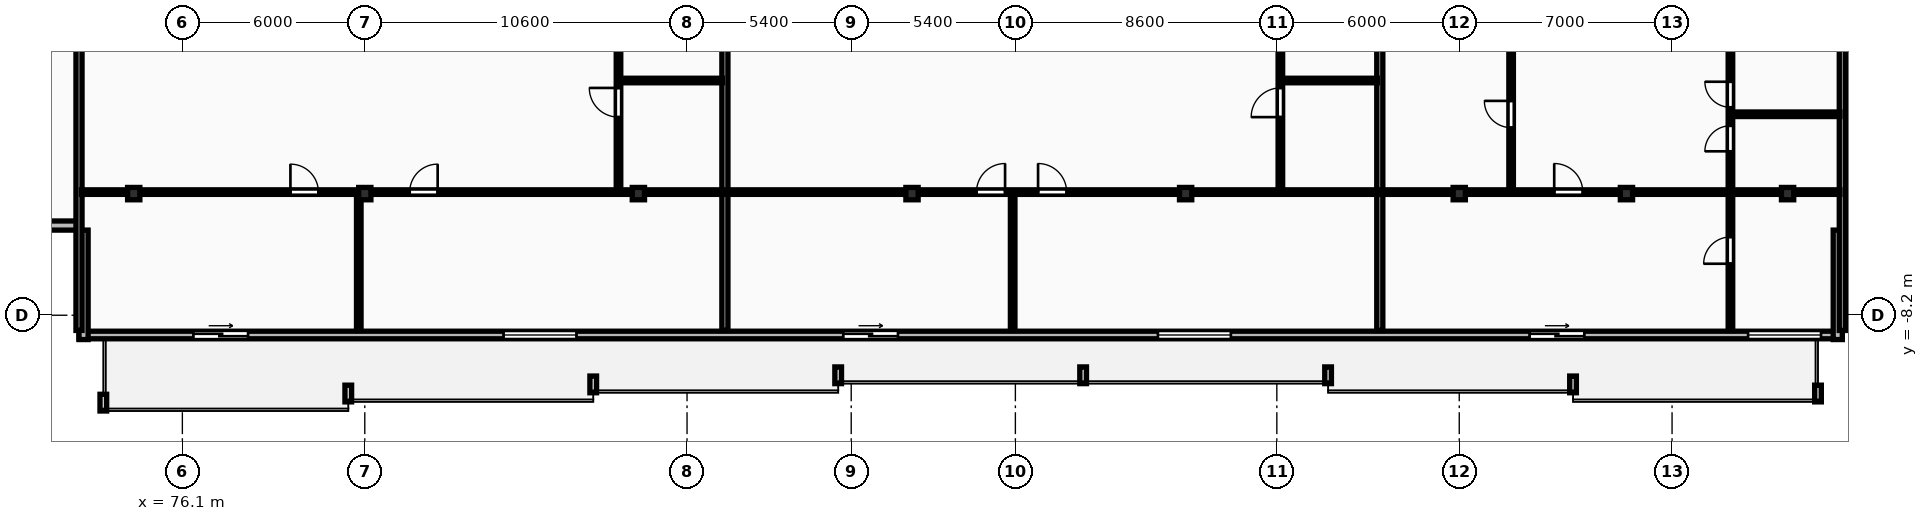
"""IFC4 building model, lengths in metres.
Left out: names, types, materials, properties, quantities, classifications, styles, units other than length and angle.
Written with IfcOpenShell. Run it as: python <this file> out.ifc"""

import sys

from ifc_helpers import new_model, si_unit, direction, frame, frame_2d, origin, origin_2d, place, context, subcontext, project, spatial, rectangle, i_section, extrude, element, fill, save


model = new_model("IFC4")
c1 = context("Model", 3, precision=1e-05, world=origin(), true_north=direction((0.0, 1.0)))
c2 = subcontext(c1, "Body", "Model", "MODEL_VIEW")
j1 = project(units=[si_unit("LENGTHUNIT", "METRE"), si_unit("PLANEANGLEUNIT", "RADIAN")], contexts=[c1])
p1 = place(None, origin())
s1 = spatial("IfcSite", under=j1, at=p1, CompositionType="ELEMENT")
p2 = place(p1, origin())
s2 = spatial("IfcBuilding", under=s1, at=p2, CompositionType="ELEMENT")
p3 = place(p2, frame((0.0, 0.0, 150.1)))
s3 = spatial("IfcBuildingStorey", under=s2, at=p3, CompositionType="ELEMENT", Elevation=150.1)
for number, where, z_axis, x_axis in (
    (1, (74.5, -4.2, 0.0), (0.0, 0.0, 1.0), (1.0, 0.0, 0.0)),
    (2, (82.1, -4.2, 0.0), (0.0, 0.0, 1.0), (1.0, 0.0, 0.0)),
    (3, (91.1, -4.2, 0.0), (0.0, 0.0, 1.0), (1.0, 0.0, 0.0)),
    (4, (100.1, -4.2, 0.0), (0.0, 0.0, 1.0), (1.0, 0.0, 0.0)),
    (5, (109.1, -4.2, 0.0), (0.0, 0.0, 1.0), (1.0, 0.0, 0.0)),
    (6, (118.1, -4.2, 0.0), (0.0, 0.0, 1.0), (1.0, 0.0, 0.0)),
    (7, (123.6, -4.2, 0.0), (0.0, 0.0, 1.0), (1.0, 0.0, 0.0)),
    (8, (128.9, -4.2, 0.0), (0.0, 0.0, 1.0), (1.0, 0.0, 0.0)),
):
    element("IfcColumn", number, at=place(p3, frame(where, z_axis=z_axis, x_axis=x_axis)), inside=s3, PredefinedType="COLUMN", context=c2, shape_type="SweptSolid", body=[
        extrude(i_section(OverallWidth=0.403, OverallDepth=0.406, WebThickness=0.027, FlangeThickness=0.043, FilletRadius=0.015, at=origin_2d()), origin(), (0.0, 0.0, 1.0), 3.6),
    ])
p4 = place(p3, frame((72.7, -8.85, 0.0), z_axis=(0.0, 0.0, 1.0), x_axis=(1.0, 0.0, 0.0)))
e9 = element("IfcWall", 9, at=p4, inside=s3, PredefinedType="STANDARD", context=c2, shape_type="SweptSolid", body=[
    extrude(rectangle(XDim=58.0, YDim=0.25, at=frame_2d((29.0, 0.0))), origin(), (0.0, 0.0, 1.0), 3.31),
])
p5 = place(p4, frame((3.761, 0.0, 0.0)))
e10 = element("IfcOpeningElement", 10, at=p5, cuts=e9, PredefinedType="OPENING", context=c2, shape_type="SweptSolid", body=[
    extrude(rectangle(XDim=1.8, YDim=2.2, at=frame_2d((0.9, 1.1))), frame((0.0, 0.135, 0.0), z_axis=(0.0, -1.0, 0.0), x_axis=(1.0, 0.0, 0.0)), (0.0, 0.0, 1.0), 0.27),
])
p6 = place(p4, frame((13.964, 0.0, 0.85)))
e11 = element("IfcOpeningElement", 11, at=p6, cuts=e9, PredefinedType="OPENING", context=c2, shape_type="SweptSolid", body=[
    extrude(rectangle(XDim=2.4, YDim=1.9, at=frame_2d((1.2, 0.95))), frame((0.0, 0.135, 0.0), z_axis=(0.0, -1.0, 0.0), x_axis=(1.0, 0.0, 0.0)), (0.0, 0.0, 1.0), 0.27),
])
p7 = place(p4, frame((25.138, 0.0, 0.0)))
e12 = element("IfcOpeningElement", 12, at=p7, cuts=e9, PredefinedType="OPENING", context=c2, shape_type="SweptSolid", body=[
    extrude(rectangle(XDim=1.8, YDim=2.2, at=frame_2d((0.9, 1.1))), frame((0.0, 0.135, 0.0), z_axis=(0.0, -1.0, 0.0), x_axis=(1.0, 0.0, 0.0)), (0.0, 0.0, 1.0), 0.27),
])
p8 = place(p4, frame((35.489, 0.0, 0.85)))
e13 = element("IfcOpeningElement", 13, at=p8, cuts=e9, PredefinedType="OPENING", context=c2, shape_type="SweptSolid", body=[
    extrude(rectangle(XDim=2.4, YDim=1.9, at=frame_2d((1.2, 0.95))), frame((0.0, 0.135, 0.0), z_axis=(0.0, -1.0, 0.0), x_axis=(1.0, 0.0, 0.0)), (0.0, 0.0, 1.0), 0.27),
])
p9 = place(p4, frame((47.713, 0.0, 0.0)))
e14 = element("IfcOpeningElement", 14, at=p9, cuts=e9, PredefinedType="OPENING", context=c2, shape_type="SweptSolid", body=[
    extrude(rectangle(XDim=1.8, YDim=2.2, at=frame_2d((0.9, 1.1))), frame((0.0, 0.135, 0.0), z_axis=(0.0, -1.0, 0.0), x_axis=(1.0, 0.0, 0.0)), (0.0, 0.0, 1.0), 0.27),
])
p10 = place(p4, frame((54.9, 0.0, 0.85)))
e15 = element("IfcOpeningElement", 15, at=p10, cuts=e9, PredefinedType="OPENING", context=c2, shape_type="SweptSolid", body=[
    extrude(rectangle(XDim=2.4, YDim=1.9, at=frame_2d((1.2, 0.95))), frame((0.0, 0.135, 0.0), z_axis=(0.0, -1.0, 0.0), x_axis=(1.0, 0.0, 0.0)), (0.0, 0.0, 1.0), 0.27),
])
for number, where, z_axis, x_axis in (
    (16, (130.55, -9.0, 0.0), (0.0, 0.0, 1.0), (0.0, 1.0, 0.0)),
    (17, (130.7, -5.25, 0.0), (0.0, 0.0, 1.0), (1.0, 0.0, 0.0)),
):
    element("IfcWall", number, at=place(p3, frame(where, z_axis=z_axis, x_axis=x_axis)), inside=s3, PredefinedType="STANDARD", context=c2, shape_type="SweptSolid", body=[
        extrude(rectangle(XDim=3.6, YDim=0.3, at=frame_2d((1.8, 0.0))), origin(), (0.0, 0.0, 1.0), 3.31),
    ])
p11 = place(p3, frame((69.1, -5.25, 0.0), z_axis=(0.0, 0.0, 1.0), x_axis=(1.0, 0.0, 0.0)))
e18 = element("IfcWall", 18, at=p11, inside=s3, PredefinedType="STANDARD", context=c2, shape_type="SweptSolid", body=[
    extrude(rectangle(XDim=3.6, YDim=0.3, at=frame_2d((1.8, 0.0))), origin(), (0.0, 0.0, 1.0), 3.31),
])
p12 = place(p3, frame((72.85, -5.4, 0.0), z_axis=(0.0, 0.0, 1.0), x_axis=(0.0, -1.0, 0.0)))
e19 = element("IfcWall", 19, at=p12, inside=s3, PredefinedType="STANDARD", context=c2, shape_type="SweptSolid", body=[
    extrude(rectangle(XDim=3.6, YDim=0.3, at=frame_2d((1.8, 0.0))), origin(), (0.0, 0.0, 1.0), 3.31),
])
for number, where, z_axis, x_axis in (
    (20, (72.7, -8.7, 0.0), (0.0, 0.0, 1.0), (0.0, 1.0, 0.0)),
    (21, (130.7, -8.7, 0.0), (0.0, 0.0, 1.0), (0.0, 1.0, 0.0)),
    (22, (93.946, -8.7, 0.0), (0.0, 0.0, 1.0), (0.0, 1.0, 0.0)),
):
    element("IfcWall", number, at=place(p3, frame(where, z_axis=z_axis, x_axis=x_axis)), inside=s3, PredefinedType="PARTITIONING", context=c2, shape_type="SweptSolid", body=[
        extrude(rectangle(XDim=24.57, YDim=0.2, at=frame_2d((12.285, 0.0))), origin(), (0.0, 0.0, 1.0), 3.31),
    ])
p13 = place(p3, frame((90.506, -0.48, 0.0), z_axis=(0.0, 0.0, 1.0), x_axis=(1.0, 0.0, 0.0)))
e23 = element("IfcWall", 23, at=p13, inside=s3, PredefinedType="PARTITIONING", context=c2, shape_type="SweptSolid", body=[
    extrude(rectangle(XDim=3.36, YDim=0.15, at=frame_2d((1.68, 0.0))), origin(), (0.0, 0.0, 1.0), 3.31),
])
p14 = place(p3, frame((90.446, -4.09, 0.0), z_axis=(0.0, 0.0, 1.0), x_axis=(0.0, 1.0, 0.0)))
e24 = element("IfcWall", 24, at=p14, inside=s3, PredefinedType="PARTITIONING", context=c2, shape_type="SweptSolid", body=[
    extrude(rectangle(XDim=19.98, YDim=0.15, at=frame_2d((9.99, 0.0))), origin(), (0.0, 0.0, 1.0), 3.31),
])
p15 = place(p14, frame((2.406, 0.0, 0.0)))
e25 = element("IfcOpeningElement", 25, at=p15, cuts=e24, PredefinedType="OPENING", context=c2, shape_type="SweptSolid", body=[
    extrude(rectangle(XDim=0.96, YDim=2.1, at=frame_2d((0.48, 1.05))), frame((0.0, 0.085, 0.0), z_axis=(0.0, -1.0, 0.0), x_axis=(1.0, 0.0, 0.0)), (0.0, 0.0, 1.0), 0.17),
])
p16 = place(p14, frame((6.133, 0.0, 0.0)))
e26 = element("IfcOpeningElement", 26, at=p16, cuts=e24, PredefinedType="OPENING", context=c2, shape_type="SweptSolid", body=[
    extrude(rectangle(XDim=0.88, YDim=2.06, at=frame_2d((0.44, 1.03))), frame((0.0, 0.085, 0.0), z_axis=(0.0, -1.0, 0.0), x_axis=(1.0, 0.0, 0.0)), (0.0, 0.0, 1.0), 0.17),
])
p17 = place(p14, frame((8.602, 0.0, 0.0)))
e27 = element("IfcOpeningElement", 27, at=p17, cuts=e24, PredefinedType="OPENING", context=c2, shape_type="SweptSolid", body=[
    extrude(rectangle(XDim=0.84, YDim=2.04, at=frame_2d((0.42, 1.02))), frame((0.0, 0.085, 0.0), z_axis=(0.0, -1.0, 0.0), x_axis=(1.0, 0.0, 0.0)), (0.0, 0.0, 1.0), 0.17),
])
p18 = place(p3, frame((81.903, -8.7, 0.0), z_axis=(0.0, 0.0, 1.0), x_axis=(0.0, 1.0, 0.0)))
e28 = element("IfcWall", 28, at=p18, inside=s3, PredefinedType="PARTITIONING", context=c2, shape_type="SweptSolid", body=[
    extrude(rectangle(XDim=4.47, YDim=0.15, at=frame_2d((2.235, 0.0))), origin(), (0.0, 0.0, 1.0), 3.31),
])
p19 = place(p3, frame((72.78, -4.15, 0.0), z_axis=(0.0, 0.0, 1.0), x_axis=(1.0, 0.0, 0.0)))
e29 = element("IfcWall", 29, at=p19, inside=s3, PredefinedType="PARTITIONING", context=c2, shape_type="SweptSolid", body=[
    extrude(rectangle(XDim=21.085, YDim=0.15, at=frame_2d((10.543, 0.0))), origin(), (0.0, 0.0, 1.0), 3.003),
])
p20 = place(p19, frame((6.874, 0.0, 0.0)))
e30 = element("IfcOpeningElement", 30, at=p20, cuts=e29, PredefinedType="OPENING", context=c2, shape_type="SweptSolid", body=[
    extrude(rectangle(XDim=0.92, YDim=2.08, at=frame_2d((0.46, 1.04))), frame((0.0, 0.085, 0.0), z_axis=(0.0, -1.0, 0.0), x_axis=(1.0, 0.0, 0.0)), (0.0, 0.0, 1.0), 0.17),
])
p21 = place(p19, frame((10.797, 0.0, 0.0)))
e31 = element("IfcOpeningElement", 31, at=p21, cuts=e29, PredefinedType="OPENING", context=c2, shape_type="SweptSolid", body=[
    extrude(rectangle(XDim=0.92, YDim=2.08, at=frame_2d((0.46, 1.04))), frame((0.0, 0.085, 0.0), z_axis=(0.0, -1.0, 0.0), x_axis=(1.0, 0.0, 0.0)), (0.0, 0.0, 1.0), 0.17),
])
p22 = place(p3, frame((115.486, -8.7, 0.0), z_axis=(0.0, 0.0, 1.0), x_axis=(0.0, 1.0, 0.0)))
e32 = element("IfcWall", 32, at=p22, inside=s3, PredefinedType="PARTITIONING", context=c2, shape_type="SweptSolid", body=[
    extrude(rectangle(XDim=24.57, YDim=0.2, at=frame_2d((12.285, 0.0))), origin(), (0.0, 0.0, 1.0), 3.31),
])
p23 = place(p3, frame((112.276, -0.48, 0.0), z_axis=(0.0, 0.0, 1.0), x_axis=(1.0, 0.0, 0.0)))
e33 = element("IfcWall", 33, at=p23, inside=s3, PredefinedType="PARTITIONING", context=c2, shape_type="SweptSolid", body=[
    extrude(rectangle(XDim=3.13, YDim=0.15, at=frame_2d((1.565, 0.0))), origin(), (0.0, 0.0, 1.0), 3.31),
])
p24 = place(p3, frame((112.216, -4.09, 0.0), z_axis=(0.0, 0.0, 1.0), x_axis=(0.0, 1.0, 0.0)))
e34 = element("IfcWall", 34, at=p24, inside=s3, PredefinedType="PARTITIONING", context=c2, shape_type="SweptSolid", body=[
    extrude(rectangle(XDim=19.98, YDim=0.15, at=frame_2d((9.99, 0.0))), origin(), (0.0, 0.0, 1.0), 3.31),
])
p25 = place(p24, frame((2.406, 0.0, 0.0)))
e35 = element("IfcOpeningElement", 35, at=p25, cuts=e34, PredefinedType="OPENING", context=c2, shape_type="SweptSolid", body=[
    extrude(rectangle(XDim=0.96, YDim=2.1, at=frame_2d((0.48, 1.05))), frame((0.0, 0.085, 0.0), z_axis=(0.0, -1.0, 0.0), x_axis=(1.0, 0.0, 0.0)), (0.0, 0.0, 1.0), 0.17),
])
p26 = place(p24, frame((6.133, 0.0, 0.0)))
e36 = element("IfcOpeningElement", 36, at=p26, cuts=e34, PredefinedType="OPENING", context=c2, shape_type="SweptSolid", body=[
    extrude(rectangle(XDim=0.88, YDim=2.06, at=frame_2d((0.44, 1.03))), frame((0.0, 0.085, 0.0), z_axis=(0.0, -1.0, 0.0), x_axis=(1.0, 0.0, 0.0)), (0.0, 0.0, 1.0), 0.17),
])
p27 = place(p24, frame((9.57, 0.0, 0.0)))
e37 = element("IfcOpeningElement", 37, at=p27, cuts=e34, PredefinedType="OPENING", context=c2, shape_type="SweptSolid", body=[
    extrude(rectangle(XDim=0.84, YDim=2.04, at=frame_2d((0.42, 1.02))), frame((0.0, 0.085, 0.0), z_axis=(0.0, -1.0, 0.0), x_axis=(1.0, 0.0, 0.0)), (0.0, 0.0, 1.0), 0.17),
])
p28 = place(p3, frame((103.411, -8.7, 0.0), z_axis=(0.0, 0.0, 1.0), x_axis=(0.0, 1.0, 0.0)))
e38 = element("IfcWall", 38, at=p28, inside=s3, PredefinedType="PARTITIONING", context=c2, shape_type="SweptSolid", body=[
    extrude(rectangle(XDim=4.47, YDim=0.15, at=frame_2d((2.235, 0.0))), origin(), (0.0, 0.0, 1.0), 3.31),
])
p29 = place(p3, frame((94.025, -4.15, 0.0), z_axis=(0.0, 0.0, 1.0), x_axis=(1.0, 0.0, 0.0)))
e39 = element("IfcWall", 39, at=p29, inside=s3, PredefinedType="PARTITIONING", context=c2, shape_type="SweptSolid", body=[
    extrude(rectangle(XDim=21.381, YDim=0.15, at=frame_2d((10.69, 0.0))), origin(), (0.0, 0.0, 1.0), 3.003),
])
p30 = place(p29, frame((8.195, 0.0, 0.0)))
e40 = element("IfcOpeningElement", 40, at=p30, cuts=e39, PredefinedType="OPENING", context=c2, shape_type="SweptSolid", body=[
    extrude(rectangle(XDim=0.94, YDim=2.1, at=frame_2d((0.47, 1.05))), frame((0.0, 0.085, 0.0), z_axis=(0.0, -1.0, 0.0), x_axis=(1.0, 0.0, 0.0)), (0.0, 0.0, 1.0), 0.17),
])
p31 = place(p29, frame((10.22, 0.0, 0.0)))
e41 = element("IfcOpeningElement", 41, at=p31, cuts=e39, PredefinedType="OPENING", context=c2, shape_type="SweptSolid", body=[
    extrude(rectangle(XDim=0.94, YDim=2.1, at=frame_2d((0.47, 1.05))), frame((0.0, 0.085, 0.0), z_axis=(0.0, -1.0, 0.0), x_axis=(1.0, 0.0, 0.0)), (0.0, 0.0, 1.0), 0.17),
])
p32 = place(p3, frame((119.806, -4.09, 0.0), z_axis=(0.0, 0.0, 1.0), x_axis=(0.0, 1.0, 0.0)))
e42 = element("IfcWall", 42, at=p32, inside=s3, PredefinedType="PARTITIONING", context=c2, shape_type="SweptSolid", body=[
    extrude(rectangle(XDim=5.0, YDim=0.15, at=frame_2d((2.5, 0.0))), origin(), (0.0, 0.0, 1.0), 3.31),
])
p33 = place(p32, frame((2.06, 0.0, 0.0)))
e43 = element("IfcOpeningElement", 43, at=p33, cuts=e42, PredefinedType="OPENING", context=c2, shape_type="SweptSolid", body=[
    extrude(rectangle(XDim=0.88, YDim=2.06, at=frame_2d((0.44, 1.03))), frame((0.0, 0.085, 0.0), z_axis=(0.0, -1.0, 0.0), x_axis=(1.0, 0.0, 0.0)), (0.0, 0.0, 1.0), 0.17),
])
p34 = place(p3, frame((127.08, -1.59, 0.0), z_axis=(0.0, 0.0, 1.0), x_axis=(1.0, 0.0, 0.0)))
e44 = element("IfcWall", 44, at=p34, inside=s3, PredefinedType="PARTITIONING", context=c2, shape_type="SweptSolid", body=[
    extrude(rectangle(XDim=3.54, YDim=0.15, at=frame_2d((1.77, 0.0))), origin(), (0.0, 0.0, 1.0), 3.31),
])
p35 = place(p3, frame((127.02, -8.7, 0.0), z_axis=(0.0, 0.0, 1.0), x_axis=(0.0, 1.0, 0.0)))
e45 = element("IfcWall", 45, at=p35, inside=s3, PredefinedType="PARTITIONING", context=c2, shape_type="SweptSolid", body=[
    extrude(rectangle(XDim=9.61, YDim=0.15, at=frame_2d((4.805, 0.0))), origin(), (0.0, 0.0, 1.0), 3.31),
])
p36 = place(p35, frame((5.892, 0.0, 0.0)))
e46 = element("IfcOpeningElement", 46, at=p36, cuts=e45, PredefinedType="OPENING", context=c2, shape_type="SweptSolid", body=[
    extrude(rectangle(XDim=0.84, YDim=2.04, at=frame_2d((0.42, 1.02))), frame((0.0, 0.085, 0.0), z_axis=(0.0, -1.0, 0.0), x_axis=(1.0, 0.0, 0.0)), (0.0, 0.0, 1.0), 0.17),
])
p37 = place(p35, frame((7.34, 0.0, 0.0)))
e47 = element("IfcOpeningElement", 47, at=p37, cuts=e45, PredefinedType="OPENING", context=c2, shape_type="SweptSolid", body=[
    extrude(rectangle(XDim=0.84, YDim=2.04, at=frame_2d((0.42, 1.02))), frame((0.0, 0.085, 0.0), z_axis=(0.0, -1.0, 0.0), x_axis=(1.0, 0.0, 0.0)), (0.0, 0.0, 1.0), 0.17),
])
p38 = place(p35, frame((2.194, 0.0, 0.0)))
e48 = element("IfcOpeningElement", 48, at=p38, cuts=e45, PredefinedType="OPENING", context=c2, shape_type="SweptSolid", body=[
    extrude(rectangle(XDim=0.88, YDim=2.06, at=frame_2d((0.44, 1.03))), frame((0.0, 0.085, 0.0), z_axis=(0.0, -1.0, 0.0), x_axis=(1.0, 0.0, 0.0)), (0.0, 0.0, 1.0), 0.17),
])
p39 = place(p3, frame((115.566, -4.15, 0.0), z_axis=(0.0, 0.0, 1.0), x_axis=(1.0, 0.0, 0.0)))
e49 = element("IfcWall", 49, at=p39, inside=s3, PredefinedType="PARTITIONING", context=c2, shape_type="SweptSolid", body=[
    extrude(rectangle(XDim=15.054, YDim=0.15, at=frame_2d((7.527, 0.0))), origin(), (0.0, 0.0, 1.0), 3.003),
])
p40 = place(p39, frame((5.657, 0.0, 0.0)))
e50 = element("IfcOpeningElement", 50, at=p40, cuts=e49, PredefinedType="OPENING", context=c2, shape_type="SweptSolid", body=[
    extrude(rectangle(XDim=0.94, YDim=2.1, at=frame_2d((0.47, 1.05))), frame((0.0, 0.085, 0.0), z_axis=(0.0, -1.0, 0.0), x_axis=(1.0, 0.0, 0.0)), (0.0, 0.0, 1.0), 0.17),
])
p41 = place(p5, origin())
e51 = element("IfcDoor", 51, at=p41, inside=s3, OperationType="SLIDING_TO_RIGHT", PredefinedType="DOOR", context=c2, shape_type="SweptSolid", body=[
    extrude(rectangle(XDim=1.8, YDim=2.2, at=frame_2d((0.9, 1.1))), frame((0.0, 0.025, 0.0), z_axis=(0.0, -1.0, 0.0), x_axis=(1.0, 0.0, 0.0)), (0.0, 0.0, 1.0), 0.05),
])
fill(e10, e51)
p42 = place(p6, origin())
e52 = element("IfcWindow", 52, at=p42, inside=s3, PartitioningType="DOUBLE_PANEL_VERTICAL", PredefinedType="WINDOW", context=c2, shape_type="SweptSolid", body=[
    extrude(rectangle(XDim=2.4, YDim=1.9, at=frame_2d((1.2, 0.95))), frame((0.0, 0.03, 0.0), z_axis=(0.0, -1.0, 0.0), x_axis=(1.0, 0.0, 0.0)), (0.0, 0.0, 1.0), 0.06),
])
fill(e11, e52)
p43 = place(p7, origin())
e53 = element("IfcDoor", 53, at=p43, inside=s3, OperationType="SLIDING_TO_RIGHT", PredefinedType="DOOR", context=c2, shape_type="SweptSolid", body=[
    extrude(rectangle(XDim=1.8, YDim=2.2, at=frame_2d((0.9, 1.1))), frame((0.0, 0.025, 0.0), z_axis=(0.0, -1.0, 0.0), x_axis=(1.0, 0.0, 0.0)), (0.0, 0.0, 1.0), 0.05),
])
fill(e12, e53)
p44 = place(p8, origin())
e54 = element("IfcWindow", 54, at=p44, inside=s3, PartitioningType="DOUBLE_PANEL_VERTICAL", PredefinedType="WINDOW", context=c2, shape_type="SweptSolid", body=[
    extrude(rectangle(XDim=2.4, YDim=1.9, at=frame_2d((1.2, 0.95))), frame((0.0, 0.03, 0.0), z_axis=(0.0, -1.0, 0.0), x_axis=(1.0, 0.0, 0.0)), (0.0, 0.0, 1.0), 0.06),
])
fill(e13, e54)
p45 = place(p9, origin())
e55 = element("IfcDoor", 55, at=p45, inside=s3, OperationType="SLIDING_TO_RIGHT", PredefinedType="DOOR", context=c2, shape_type="SweptSolid", body=[
    extrude(rectangle(XDim=1.8, YDim=2.2, at=frame_2d((0.9, 1.1))), frame((0.0, 0.025, 0.0), z_axis=(0.0, -1.0, 0.0), x_axis=(1.0, 0.0, 0.0)), (0.0, 0.0, 1.0), 0.05),
])
fill(e14, e55)
p46 = place(p10, origin())
e56 = element("IfcWindow", 56, at=p46, inside=s3, PartitioningType="DOUBLE_PANEL_VERTICAL", PredefinedType="WINDOW", context=c2, shape_type="SweptSolid", body=[
    extrude(rectangle(XDim=2.4, YDim=1.9, at=frame_2d((1.2, 0.95))), frame((0.0, 0.03, 0.0), z_axis=(0.0, -1.0, 0.0), x_axis=(1.0, 0.0, 0.0)), (0.0, 0.0, 1.0), 0.06),
])
fill(e15, e56)
p47 = place(p15, origin())
e57 = element("IfcDoor", 57, at=p47, inside=s3, OperationType="SINGLE_SWING_RIGHT", PredefinedType="DOOR", context=c2, shape_type="SweptSolid", body=[
    extrude(rectangle(XDim=0.96, YDim=2.1, at=frame_2d((0.48, 1.05))), frame((0.0, 0.025, 0.0), z_axis=(0.0, -1.0, 0.0), x_axis=(1.0, 0.0, 0.0)), (0.0, 0.0, 1.0), 0.05),
])
fill(e25, e57)
p48 = place(p20, origin())
e58 = element("IfcDoor", 58, at=p48, inside=s3, OperationType="SINGLE_SWING_LEFT", PredefinedType="DOOR", context=c2, shape_type="SweptSolid", body=[
    extrude(rectangle(XDim=0.92, YDim=2.08, at=frame_2d((0.46, 1.04))), frame((0.0, 0.025, 0.0), z_axis=(0.0, -1.0, 0.0), x_axis=(1.0, 0.0, 0.0)), (0.0, 0.0, 1.0), 0.05),
])
fill(e30, e58)
p49 = place(p21, origin())
e59 = element("IfcDoor", 59, at=p49, inside=s3, OperationType="SINGLE_SWING_RIGHT", PredefinedType="DOOR", context=c2, shape_type="SweptSolid", body=[
    extrude(rectangle(XDim=0.92, YDim=2.08, at=frame_2d((0.46, 1.04))), frame((0.0, 0.025, 0.0), z_axis=(0.0, -1.0, 0.0), x_axis=(1.0, 0.0, 0.0)), (0.0, 0.0, 1.0), 0.05),
])
fill(e31, e59)
p50 = place(p25, origin())
e60 = element("IfcDoor", 60, at=p50, inside=s3, OperationType="SINGLE_SWING_LEFT", PredefinedType="DOOR", context=c2, shape_type="SweptSolid", body=[
    extrude(rectangle(XDim=0.96, YDim=2.1, at=frame_2d((0.48, 1.05))), frame((0.0, 0.025, 0.0), z_axis=(0.0, -1.0, 0.0), x_axis=(1.0, 0.0, 0.0)), (0.0, 0.0, 1.0), 0.05),
])
fill(e35, e60)
p51 = place(p30, origin())
e61 = element("IfcDoor", 61, at=p51, inside=s3, OperationType="SINGLE_SWING_RIGHT", PredefinedType="DOOR", context=c2, shape_type="SweptSolid", body=[
    extrude(rectangle(XDim=0.94, YDim=2.1, at=frame_2d((0.47, 1.05))), frame((0.0, 0.025, 0.0), z_axis=(0.0, -1.0, 0.0), x_axis=(1.0, 0.0, 0.0)), (0.0, 0.0, 1.0), 0.05),
])
fill(e40, e61)
p52 = place(p31, origin())
e62 = element("IfcDoor", 62, at=p52, inside=s3, OperationType="SINGLE_SWING_LEFT", PredefinedType="DOOR", context=c2, shape_type="SweptSolid", body=[
    extrude(rectangle(XDim=0.94, YDim=2.1, at=frame_2d((0.47, 1.05))), frame((0.0, 0.025, 0.0), z_axis=(0.0, -1.0, 0.0), x_axis=(1.0, 0.0, 0.0)), (0.0, 0.0, 1.0), 0.05),
])
fill(e41, e62)
p53 = place(p33, origin())
e63 = element("IfcDoor", 63, at=p53, inside=s3, OperationType="SINGLE_SWING_RIGHT", PredefinedType="DOOR", context=c2, shape_type="SweptSolid", body=[
    extrude(rectangle(XDim=0.88, YDim=2.06, at=frame_2d((0.44, 1.03))), frame((0.0, 0.025, 0.0), z_axis=(0.0, -1.0, 0.0), x_axis=(1.0, 0.0, 0.0)), (0.0, 0.0, 1.0), 0.05),
])
fill(e43, e63)
p54 = place(p36, origin())
e64 = element("IfcDoor", 64, at=p54, inside=s3, OperationType="SINGLE_SWING_LEFT", PredefinedType="DOOR", context=c2, shape_type="SweptSolid", body=[
    extrude(rectangle(XDim=0.84, YDim=2.04, at=frame_2d((0.42, 1.02))), frame((0.0, 0.025, 0.0), z_axis=(0.0, -1.0, 0.0), x_axis=(1.0, 0.0, 0.0)), (0.0, 0.0, 1.0), 0.05),
])
fill(e46, e64)
p55 = place(p37, origin())
e65 = element("IfcDoor", 65, at=p55, inside=s3, OperationType="SINGLE_SWING_RIGHT", PredefinedType="DOOR", context=c2, shape_type="SweptSolid", body=[
    extrude(rectangle(XDim=0.84, YDim=2.04, at=frame_2d((0.42, 1.02))), frame((0.0, 0.025, 0.0), z_axis=(0.0, -1.0, 0.0), x_axis=(1.0, 0.0, 0.0)), (0.0, 0.0, 1.0), 0.05),
])
fill(e47, e65)
p56 = place(p38, origin())
e66 = element("IfcDoor", 66, at=p56, inside=s3, OperationType="SINGLE_SWING_LEFT", PredefinedType="DOOR", context=c2, shape_type="SweptSolid", body=[
    extrude(rectangle(XDim=0.88, YDim=2.06, at=frame_2d((0.44, 1.03))), frame((0.0, 0.025, 0.0), z_axis=(0.0, -1.0, 0.0), x_axis=(1.0, 0.0, 0.0)), (0.0, 0.0, 1.0), 0.05),
])
fill(e48, e66)
p57 = place(p40, origin())
e67 = element("IfcDoor", 67, at=p57, inside=s3, OperationType="SINGLE_SWING_LEFT", PredefinedType="DOOR", context=c2, shape_type="SweptSolid", body=[
    extrude(rectangle(XDim=0.94, YDim=2.1, at=frame_2d((0.47, 1.05))), frame((0.0, 0.025, 0.0), z_axis=(0.0, -1.0, 0.0), x_axis=(1.0, 0.0, 0.0)), (0.0, 0.0, 1.0), 0.05),
])
fill(e50, e67)
save(model, sys.argv[1])
